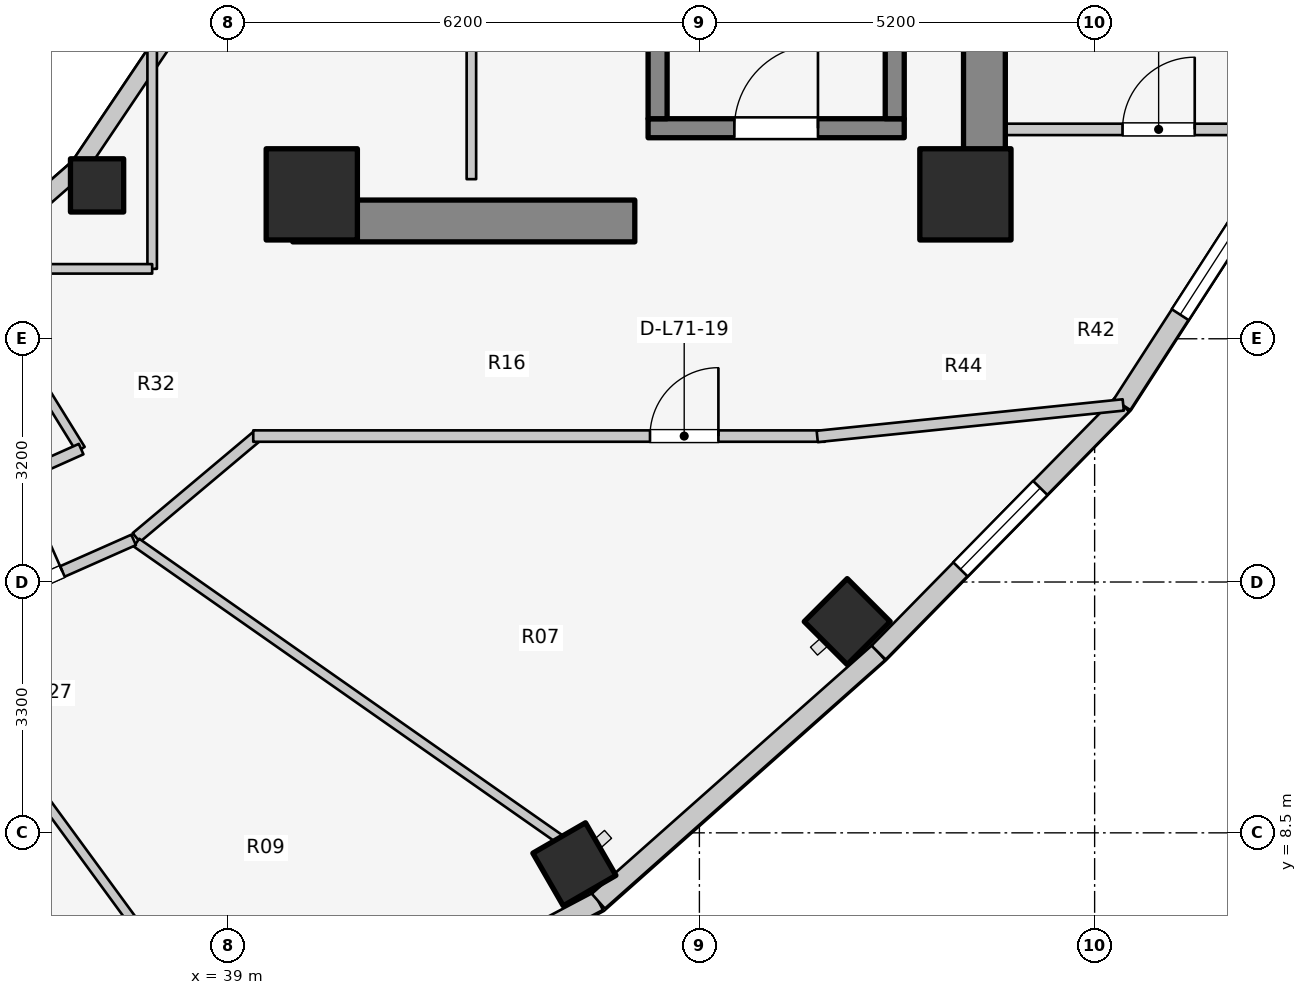
"""IFC4 building model, lengths in metres.
Left out: names, types, materials, properties, quantities, classifications, styles, units other than length and angle.
Written with IfcOpenShell. Run it as: python <this file> out.ifc"""

import sys

from ifc_helpers import new_model, si_unit, direction, frame, frame_2d, origin, origin_2d, place, context, subcontext, project, spatial, rectangle, extrude, element, fill, save


model = new_model("IFC4")
c1 = context("Model", 3, precision=1e-05, world=origin(), true_north=direction((0.0, 1.0)))
c2 = subcontext(c1, "Body", "Model", "MODEL_VIEW")
j1 = project(units=[si_unit("LENGTHUNIT", "METRE"), si_unit("PLANEANGLEUNIT", "RADIAN")], contexts=[c1])
p1 = place(None, origin())
s1 = spatial("IfcSite", under=j1, at=p1, CompositionType="ELEMENT")
p2 = place(p1, origin())
s2 = spatial("IfcBuilding", under=s1, at=p2, CompositionType="ELEMENT")
p3 = place(p2, frame((0.0, 0.0, 232.6)))
s3 = spatial("IfcBuildingStorey", under=s2, at=p3, CompositionType="ELEMENT", Elevation=232.6)
p4 = place(p3, frame((48.95, 17.05, 0.0), z_axis=(0.0, 0.0, 1.0), x_axis=(0.0, 1.0, 0.0)))
e1 = element("IfcWall", 1, at=p4, inside=s3, PredefinedType="SHEAR", context=c2, shape_type="SweptSolid", body=[
    extrude(rectangle(XDim=12.8, YDim=0.55, at=frame_2d((6.4, 0.0))), origin(), (0.0, 0.0, 1.0), 3.1),
])
p5 = place(p3, frame((39.85, 16.55, 0.0), z_axis=(0.0, 0.0, 1.0), x_axis=(1.0, 0.0, 0.0)))
e2 = element("IfcWall", 2, at=p5, inside=s3, PredefinedType="SHEAR", context=c2, shape_type="SweptSolid", body=[
    extrude(rectangle(XDim=4.5, YDim=0.55, at=frame_2d((2.25, 0.0))), origin(), (0.0, 0.0, 1.0), 3.1),
])
p6 = place(p3, frame((44.525, 17.77, 0.0), z_axis=(0.0, 0.0, 1.0), x_axis=(1.0, 0.0, 0.0)))
e3 = element("IfcWall", 3, at=p6, inside=s3, PredefinedType="SOLIDWALL", context=c2, shape_type="SweptSolid", body=[
    extrude(rectangle(XDim=3.37, YDim=0.25, at=frame_2d((1.685, 0.0))), origin(), (0.0, 0.0, 1.0), 3.1),
])
p7 = place(p6, frame((1.135, 0.0, 0.0)))
e4 = element("IfcOpeningElement", 4, at=p7, cuts=e3, PredefinedType="OPENING", context=c2, shape_type="SweptSolid", body=[
    extrude(rectangle(XDim=1.1, YDim=2.1, at=frame_2d((0.55, 1.05))), frame((0.0, 0.135, 0.0), z_axis=(0.0, -1.0, 0.0), x_axis=(1.0, 0.0, 0.0)), (0.0, 0.0, 1.0), 0.27),
])
for number, where, z_axis, x_axis in (
    (5, (44.65, 17.895, 0.0), (0.0, 0.0, 1.0), (0.0, 1.0, 0.0)),
    (6, (47.77, 17.895, 0.0), (0.0, 0.0, 1.0), (0.0, 1.0, 0.0)),
):
    element("IfcWall", number, at=place(p3, frame(where, z_axis=z_axis, x_axis=x_axis)), inside=s3, PredefinedType="SOLIDWALL", context=c2, shape_type="SweptSolid", body=[
        extrude(rectangle(XDim=7.81, YDim=0.25, at=frame_2d((3.905, 0.0))), origin(), (0.0, 0.0, 1.0), 3.1),
    ])
for number, where, z_axis, x_axis in (
    (7, (40.1, 16.9, 0.0), (0.0, 0.0, 1.0), (1.0, 0.0, 0.0)),
    (8, (48.7, 16.9, 0.0), (0.0, 0.0, 1.0), (1.0, 0.0, 0.0)),
):
    element("IfcColumn", number, at=place(p3, frame(where, z_axis=z_axis, x_axis=x_axis)), inside=s3, PredefinedType="COLUMN", context=c2, shape_type="SweptSolid", body=[
        extrude(rectangle(XDim=1.2, YDim=1.2, at=origin_2d()), origin(), (0.0, 0.0, 1.0), 3.1),
    ])
p8 = place(p3, frame((43.555, 8.086, 0.0), z_axis=(0.0, 0.0, 1.0), x_axis=(0.5, -0.866025403784, 0.0)))
e9 = element("IfcColumn", 9, at=p8, inside=s3, PredefinedType="COLUMN", context=c2, shape_type="SweptSolid", body=[
    extrude(rectangle(XDim=0.8, YDim=0.8, at=origin_2d()), origin(), (0.0, 0.0, 1.0), 3.1),
])
p9 = place(p3, frame((37.275, 17.018, 0.0), z_axis=(0.0, 0.0, 1.0), x_axis=(1.0, 0.0, 0.0)))
e10 = element("IfcColumn", 10, at=p9, inside=s3, PredefinedType="COLUMN", context=c2, shape_type="SweptSolid", body=[
    extrude(rectangle(XDim=0.7, YDim=0.7, at=origin_2d()), origin(), (0.0, 0.0, 1.0), 3.1),
])
p10 = place(p3, frame((47.145, 11.279, 0.0), z_axis=(0.0, 0.0, 1.0), x_axis=(0.707106781187, -0.707106781187, 0.0)))
e11 = element("IfcColumn", 11, at=p10, inside=s3, PredefinedType="COLUMN", context=c2, shape_type="SweptSolid", body=[
    extrude(rectangle(XDim=0.8, YDim=0.8, at=origin_2d()), origin(), (0.0, 0.0, 1.0), 3.1),
])
p11 = place(p3, frame((35.56, 15.968, 0.0), z_axis=(0.0, 0.0, 1.0), x_axis=(0.752576694707, 0.658504607869, 0.0)))
e12 = element("IfcWall", 12, at=p11, inside=s3, PredefinedType="STANDARD", context=c2, shape_type="SweptSolid", body=[
    extrude(rectangle(XDim=1.959, YDim=0.23, at=frame_2d((0.98, 0.0))), origin(), (0.0, 0.0, 1.0), 2.16),
])
p12 = place(p3, frame((37.035, 17.258, 0.0), z_axis=(0.0, 0.0, 1.0), x_axis=(0.558197800898, 0.829707909492, 0.0)))
e13 = element("IfcWall", 13, at=p12, inside=s3, PredefinedType="STANDARD", context=c2, shape_type="SweptSolid", body=[
    extrude(rectangle(XDim=2.027, YDim=0.23, at=frame_2d((1.013, 0.0))), origin(), (0.0, 0.0, 1.0), 2.16),
])
p13 = place(p3, frame((39.043, 5.048, 0.0), z_axis=(0.0, 0.0, 1.0), x_axis=(0.884000981341, 0.46748504253, 0.0)))
e14 = element("IfcWall", 14, at=p13, inside=s3, PredefinedType="STANDARD", context=c2, shape_type="SweptSolid", body=[
    extrude(rectangle(XDim=5.46, YDim=0.26, at=frame_2d((2.73, 0.0))), origin(), (0.0, 0.0, 1.0), 2.85),
])
p14 = place(p13, frame((1.53, 0.0, 0.75)))
e15 = element("IfcOpeningElement", 15, at=p14, cuts=e14, PredefinedType="OPENING", context=c2, shape_type="SweptSolid", body=[
    extrude(rectangle(XDim=2.4, YDim=1.7, at=frame_2d((1.2, 0.85))), frame((0.0, 0.14, 0.0), z_axis=(0.0, -1.0, 0.0), x_axis=(1.0, 0.0, 0.0)), (0.0, 0.0, 1.0), 0.28),
])
p15 = place(p3, frame((43.87, 7.601, 0.0), z_axis=(0.0, 0.0, 1.0), x_axis=(0.748165854006, 0.663511759428, 0.0)))
e16 = element("IfcWall", 16, at=p15, inside=s3, PredefinedType="STANDARD", context=c2, shape_type="SweptSolid", body=[
    extrude(rectangle(XDim=4.929, YDim=0.26, at=frame_2d((2.464, 0.0))), origin(), (0.0, 0.0, 1.0), 2.85),
])
p16 = place(p3, frame((47.558, 10.871, 0.0), z_axis=(0.0, 0.0, 1.0), x_axis=(0.700642973333, 0.713512034881, 0.0)))
e17 = element("IfcWall", 17, at=p16, inside=s3, PredefinedType="STANDARD", context=c2, shape_type="SweptSolid", body=[
    extrude(rectangle(XDim=4.572, YDim=0.26, at=frame_2d((2.286, 0.0))), origin(), (0.0, 0.0, 1.0), 2.85),
])
p17 = place(p16, frame((1.536, 0.0, 0.75)))
e18 = element("IfcOpeningElement", 18, at=p17, cuts=e17, PredefinedType="OPENING", context=c2, shape_type="SweptSolid", body=[
    extrude(rectangle(XDim=1.5, YDim=1.6, at=frame_2d((0.75, 0.8))), frame((0.0, 0.14, 0.0), z_axis=(0.0, -1.0, 0.0), x_axis=(1.0, 0.0, 0.0)), (0.0, 0.0, 1.0), 0.28),
])
p18 = place(p3, frame((50.761, 14.133, 0.0), z_axis=(0.0, 0.0, 1.0), x_axis=(0.542641766008, 0.839964233634, 0.0)))
e19 = element("IfcWall", 19, at=p18, inside=s3, PredefinedType="STANDARD", context=c2, shape_type="SweptSolid", body=[
    extrude(rectangle(XDim=4.319, YDim=0.26, at=frame_2d((2.16, 0.0))), origin(), (0.0, 0.0, 1.0), 2.85),
])
p19 = place(p18, frame((1.41, 0.0, 0.75)))
e20 = element("IfcOpeningElement", 20, at=p19, cuts=e19, PredefinedType="OPENING", context=c2, shape_type="SweptSolid", body=[
    extrude(rectangle(XDim=1.5, YDim=1.6, at=frame_2d((0.75, 0.8))), frame((0.0, 0.14, 0.0), z_axis=(0.0, -1.0, 0.0), x_axis=(1.0, 0.0, 0.0)), (0.0, 0.0, 1.0), 0.28),
])
p20 = place(p3, frame((42.2, 17.1, 0.0), z_axis=(0.0, 0.0, 1.0), x_axis=(0.0, 1.0, 0.0)))
e21 = element("IfcWall", 21, at=p20, inside=s3, PredefinedType="PARTITIONING", context=c2, shape_type="SweptSolid", body=[
    extrude(rectangle(XDim=2.18, YDim=0.125, at=frame_2d((1.09, 0.0))), origin(), (0.0, 0.0, 1.0), 2.855),
])
p21 = place(p3, frame((35.55, 15.985, 0.0), z_axis=(0.0, 0.0, 1.0), x_axis=(0.52592395012, -0.850531597702, 0.0)))
e22 = element("IfcWall", 22, at=p21, inside=s3, PredefinedType="PARTITIONING", context=c2, shape_type="SweptSolid", body=[
    extrude(rectangle(XDim=2.869, YDim=0.125, at=frame_2d((1.435, 0.0))), origin(), (0.0, 0.0, 1.0), 2.376),
])
p22 = place(p3, frame((34.617, 12.454, 0.0), z_axis=(0.0, 0.0, 1.0), x_axis=(0.912859324183, 0.408274239027, 0.0)))
e23 = element("IfcWall", 23, at=p22, inside=s3, PredefinedType="PARTITIONING", context=c2, shape_type="SweptSolid", body=[
    extrude(rectangle(XDim=2.682, YDim=0.15, at=frame_2d((1.341, 0.0))), origin(), (0.0, 0.0, 1.0), 2.376),
])
p23 = place(p22, frame((0.866, 0.0, 0.0)))
e24 = element("IfcOpeningElement", 24, at=p23, cuts=e23, PredefinedType="OPENING", context=c2, shape_type="SweptSolid", body=[
    extrude(rectangle(XDim=0.95, YDim=2.1, at=frame_2d((0.475, 1.05))), frame((0.0, 0.085, 0.0), z_axis=(0.0, -1.0, 0.0), x_axis=(1.0, 0.0, 0.0)), (0.0, 0.0, 1.0), 0.17),
])
p24 = place(p3, frame((38.0, 15.92, 0.0), z_axis=(0.0, 0.0, 1.0), x_axis=(0.0, 1.0, 0.0)))
e25 = element("IfcWall", 25, at=p24, inside=s3, PredefinedType="PARTITIONING", context=c2, shape_type="SweptSolid", body=[
    extrude(rectangle(XDim=4.28, YDim=0.125, at=frame_2d((2.14, 0.0))), origin(), (0.0, 0.0, 1.0), 2.232),
])
p25 = place(p3, frame((35.4, 15.92, 0.0), z_axis=(0.0, 0.0, 1.0), x_axis=(1.0, 0.0, 0.0)))
e26 = element("IfcWall", 26, at=p25, inside=s3, PredefinedType="PARTITIONING", context=c2, shape_type="SweptSolid", body=[
    extrude(rectangle(XDim=2.6, YDim=0.125, at=frame_2d((1.3, 0.0))), origin(), (0.0, 0.0, 1.0), 2.232),
])
p26 = place(p3, frame((48.95, 17.755, 0.0), z_axis=(0.0, 0.0, 1.0), x_axis=(1.0, 0.0, 0.0)))
e27 = element("IfcWall", 27, at=p26, inside=s3, PredefinedType="PARTITIONING", context=c2, shape_type="SweptSolid", body=[
    extrude(rectangle(XDim=4.175, YDim=0.15, at=frame_2d((2.087, 0.0))), origin(), (0.0, 0.0, 1.0), 2.855),
])
p27 = place(p26, frame((1.817, 0.0, 0.0)))
e28 = element("IfcOpeningElement", 28, at=p27, cuts=e27, PredefinedType="OPENING", context=c2, shape_type="SweptSolid", body=[
    extrude(rectangle(XDim=0.95, YDim=2.1, at=frame_2d((0.475, 1.05))), frame((0.0, 0.085, 0.0), z_axis=(0.0, -1.0, 0.0), x_axis=(1.0, 0.0, 0.0)), (0.0, 0.0, 1.0), 0.17),
])
p28 = place(p3, frame((37.791, 12.385, 0.0), z_axis=(0.0, 0.0, 1.0), x_axis=(0.765677451641, 0.643224719711, 0.0)))
e29 = element("IfcWall", 29, at=p28, inside=s3, PredefinedType="PARTITIONING", context=c2, shape_type="SweptSolid", body=[
    extrude(rectangle(XDim=2.105, YDim=0.15, at=frame_2d((1.053, 0.0))), origin(), (0.0, 0.0, 1.0), 2.376),
])
p29 = place(p3, frame((39.33, 13.72, 0.0), z_axis=(0.0, 0.0, 1.0), x_axis=(1.0, 0.0, 0.0)))
e30 = element("IfcWall", 30, at=p29, inside=s3, PredefinedType="PARTITIONING", context=c2, shape_type="SweptSolid", body=[
    extrude(rectangle(XDim=7.52, YDim=0.15, at=frame_2d((3.76, 0.0))), origin(), (0.0, 0.0, 1.0), 2.376),
])
p30 = place(p29, frame((5.22, 0.0, 0.0)))
e31 = element("IfcOpeningElement", 31, at=p30, cuts=e30, PredefinedType="OPENING", context=c2, shape_type="SweptSolid", body=[
    extrude(rectangle(XDim=0.9, YDim=2.1, at=frame_2d((0.45, 1.05))), frame((0.0, 0.085, 0.0), z_axis=(0.0, -1.0, 0.0), x_axis=(1.0, 0.0, 0.0)), (0.0, 0.0, 1.0), 0.17),
])
p31 = place(p3, frame((46.75, 13.715, 0.0), z_axis=(0.0, 0.0, 1.0), x_axis=(0.994734711466, 0.102483431859, 0.0)))
e32 = element("IfcWall", 32, at=p31, inside=s3, PredefinedType="PARTITIONING", context=c2, shape_type="SweptSolid", body=[
    extrude(rectangle(XDim=4.047, YDim=0.15, at=frame_2d((2.024, 0.0))), origin(), (0.0, 0.0, 1.0), 2.22),
])
p32 = place(p3, frame((35.008, 11.077, 0.0), z_axis=(0.0, 0.0, 1.0), x_axis=(0.590771495169, -0.806838918555, 0.0)))
e33 = element("IfcWall", 33, at=p32, inside=s3, PredefinedType="PARTITIONING", context=c2, shape_type="SweptSolid", body=[
    extrude(rectangle(XDim=6.347, YDim=0.125, at=frame_2d((3.173, 0.0))), origin(), (0.0, 0.0, 1.0), 2.376),
])
p33 = place(p3, frame((37.794, 12.318, 0.0), z_axis=(0.0, 0.0, 1.0), x_axis=(0.819017716307, -0.573768228796, 0.0)))
e34 = element("IfcWall", 34, at=p33, inside=s3, PredefinedType="PARTITIONING", context=c2, shape_type="SweptSolid", body=[
    extrude(rectangle(XDim=6.802, YDim=0.125, at=frame_2d((3.401, 0.0))), origin(), (0.0, 0.0, 1.0), 2.376),
])
p34 = place(p3, frame((34.968, 11.119, 0.0), z_axis=(0.0, 0.0, 1.0), x_axis=(0.914302802833, 0.405031337963, 0.0)))
e35 = element("IfcWall", 35, at=p34, inside=s3, PredefinedType="PARTITIONING", context=c2, shape_type="SweptSolid", body=[
    extrude(rectangle(XDim=3.049, YDim=0.15, at=frame_2d((1.525, 0.0))), origin(), (0.0, 0.0, 1.0), 2.376),
])
p35 = place(p34, frame((1.025, 0.0, 0.0)))
e36 = element("IfcOpeningElement", 36, at=p35, cuts=e35, PredefinedType="OPENING", context=c2, shape_type="SweptSolid", body=[
    extrude(rectangle(XDim=1.0, YDim=2.1, at=frame_2d((0.5, 1.05))), frame((0.0, 0.085, 0.0), z_axis=(0.0, -1.0, 0.0), x_axis=(1.0, 0.0, 0.0)), (0.0, 0.0, 1.0), 0.17),
])
p36 = place(p17, origin())
e37 = element("IfcWindow", 37, at=p36, inside=s3, PartitioningType="SINGLE_PANEL", PredefinedType="WINDOW", context=c2, shape_type="SweptSolid", body=[
    extrude(rectangle(XDim=1.5, YDim=1.6, at=frame_2d((0.75, 0.8))), frame((0.0, 0.03, 0.0), z_axis=(0.0, -1.0, 0.0), x_axis=(1.0, 0.0, 0.0)), (0.0, 0.0, 1.0), 0.06),
])
fill(e18, e37)
p37 = place(p19, origin())
e38 = element("IfcWindow", 38, at=p37, inside=s3, PartitioningType="SINGLE_PANEL", PredefinedType="WINDOW", context=c2, shape_type="SweptSolid", body=[
    extrude(rectangle(XDim=1.5, YDim=1.6, at=frame_2d((0.75, 0.8))), frame((0.0, 0.03, 0.0), z_axis=(0.0, -1.0, 0.0), x_axis=(1.0, 0.0, 0.0)), (0.0, 0.0, 1.0), 0.06),
])
fill(e20, e38)
p38 = place(p7, origin())
e39 = element("IfcDoor", 39, at=p38, inside=s3, OperationType="SINGLE_SWING_RIGHT", PredefinedType="DOOR", context=c2, shape_type="SweptSolid", body=[
    extrude(rectangle(XDim=1.1, YDim=2.1, at=frame_2d((0.55, 1.05))), frame((0.0, 0.025, 0.0), z_axis=(0.0, -1.0, 0.0), x_axis=(1.0, 0.0, 0.0)), (0.0, 0.0, 1.0), 0.05),
])
fill(e4, e39)
p39 = place(p27, origin())
e40 = element("IfcDoor", 40, at=p39, inside=s3, OperationType="SINGLE_SWING_RIGHT", PredefinedType="DOOR", context=c2, shape_type="SweptSolid", body=[
    extrude(rectangle(XDim=0.95, YDim=2.1, at=frame_2d((0.475, 1.05))), frame((0.0, 0.025, 0.0), z_axis=(0.0, -1.0, 0.0), x_axis=(1.0, 0.0, 0.0)), (0.0, 0.0, 1.0), 0.05),
])
fill(e28, e40)
p40 = place(p30, origin())
e41 = element("IfcDoor", 41, at=p40, inside=s3, OperationType="SINGLE_SWING_RIGHT", PredefinedType="DOOR", context=c2, shape_type="SweptSolid", body=[
    extrude(rectangle(XDim=0.9, YDim=2.1, at=frame_2d((0.45, 1.05))), frame((0.0, 0.025, 0.0), z_axis=(0.0, -1.0, 0.0), x_axis=(1.0, 0.0, 0.0)), (0.0, 0.0, 1.0), 0.05),
])
fill(e31, e41)
p41 = place(p35, origin())
e42 = element("IfcDoor", 42, at=p41, inside=s3, OperationType="SINGLE_SWING_RIGHT", PredefinedType="DOOR", context=c2, shape_type="SweptSolid", body=[
    extrude(rectangle(XDim=1.0, YDim=2.1, at=frame_2d((0.5, 1.05))), frame((0.0, 0.025, 0.0), z_axis=(0.0, -1.0, 0.0), x_axis=(1.0, 0.0, 0.0)), (0.0, 0.0, 1.0), 0.05),
])
fill(e36, e42)
save(model, sys.argv[1])
